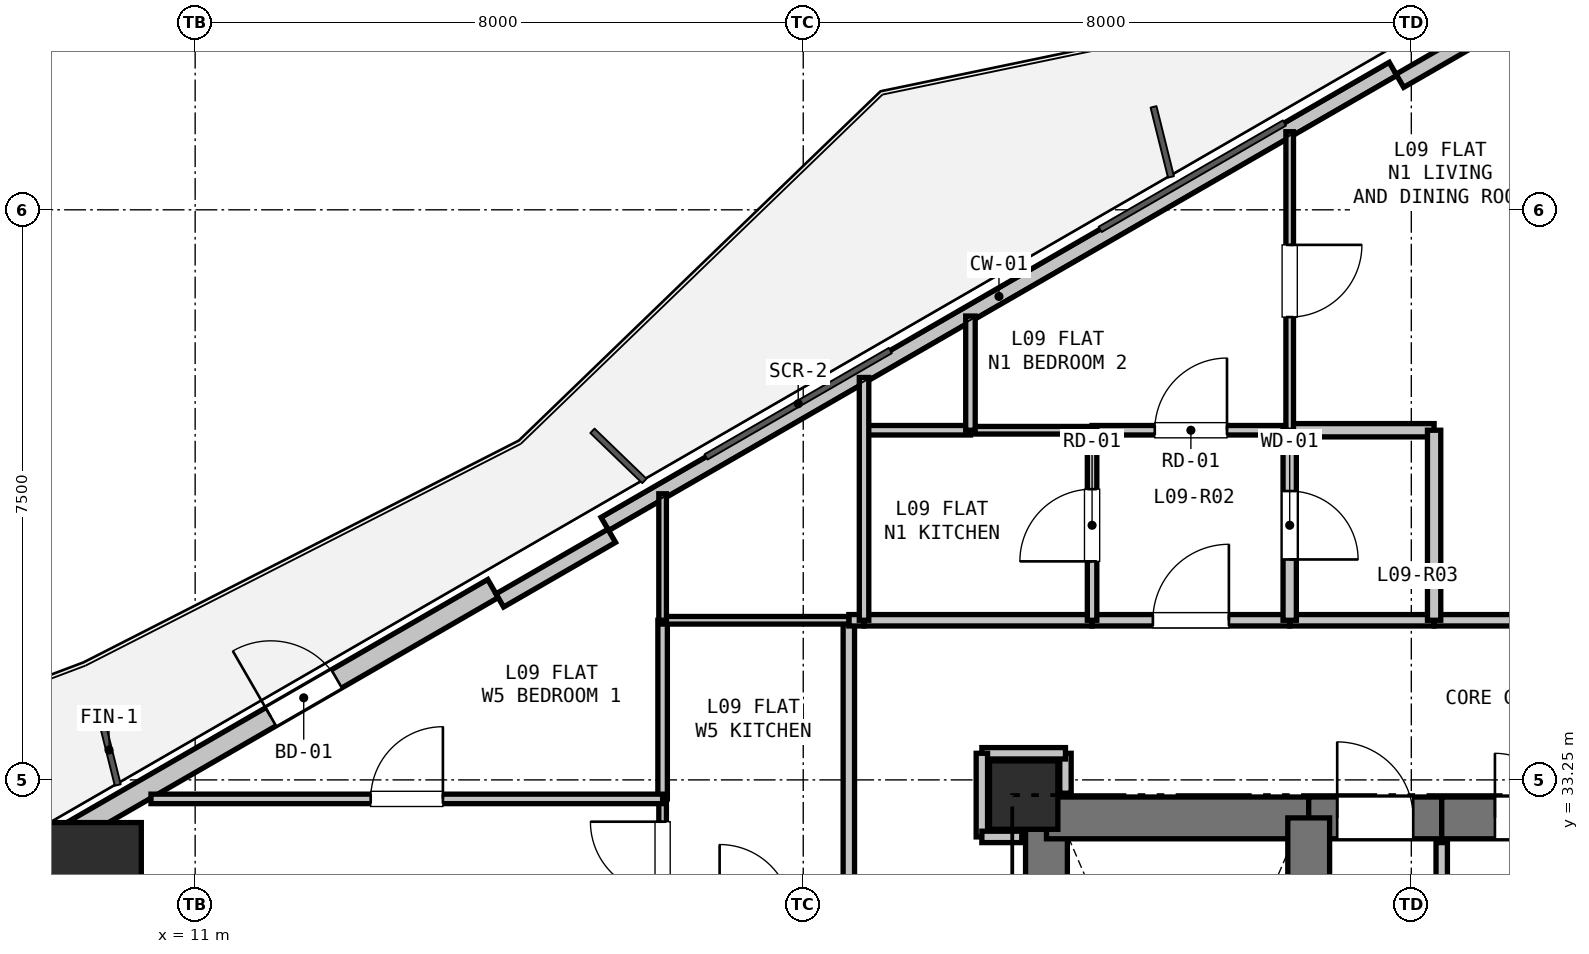
"""IFC4 building model, lengths in metres.
Left out: names, types, materials, properties, quantities, classifications, styles, units other than length and angle.
Written with IfcOpenShell. Run it as: python <this file> out.ifc"""

import sys

from ifc_helpers import new_model, si_unit, direction, frame, frame_2d, origin, origin_2d, place, context, subcontext, project, spatial, rectangle, hollow_rectangle, extrude, element, fill, save


model = new_model("IFC4")
c1 = context("Model", 3, precision=1e-05, world=origin(), true_north=direction((0.0, 1.0)))
c2 = subcontext(c1, "Body", "Model", "MODEL_VIEW")
j1 = project(units=[si_unit("LENGTHUNIT", "METRE"), si_unit("PLANEANGLEUNIT", "RADIAN")], contexts=[c1])
p1 = place(None, origin())
s1 = spatial("IfcSite", under=j1, at=p1, CompositionType="ELEMENT")
p2 = place(p1, origin())
s2 = spatial("IfcBuilding", under=s1, at=p2, CompositionType="ELEMENT")
p3 = place(p2, frame((0.0, 0.0, 35.7)))
s3 = spatial("IfcBuildingStorey", under=s2, at=p3, CompositionType="ELEMENT", Elevation=35.7)
p4 = place(p3, frame((21.9, 33.05, 0.0), z_axis=(0.0, 0.0, 1.0), x_axis=(1.0, 0.0, 0.0)))
e1 = element("IfcColumn", 1, at=p4, inside=s3, PredefinedType="COLUMN", context=c2, shape_type="SweptSolid", body=[
    extrude(rectangle(XDim=0.9, YDim=0.9, at=origin_2d()), origin(), (0.0, 0.0, 1.0), 3.3),
])
p5 = place(p3, frame((9.617, 32.014, 0.0), z_axis=(0.0, 0.0, 1.0), x_axis=(1.0, 0.0, 0.0)))
e2 = element("IfcColumn", 2, at=p5, inside=s3, PredefinedType="COLUMN", context=c2, shape_type="SweptSolid", body=[
    extrude(hollow_rectangle(XDim=1.35, YDim=1.35, WallThickness=0.036, at=origin_2d()), origin(), (0.0, 0.0, 1.0), 3.3),
])
p6 = place(p3, frame((3.943, 29.431, 0.0), z_axis=(0.0, 0.0, 1.0), x_axis=(0.866027105532, 0.499997052475, 0.0)))
e3 = element("IfcWall", 3, at=p6, inside=s3, PredefinedType="SOLIDWALL", context=c2, shape_type="SweptSolid", body=[
    extrude(rectangle(XDim=12.673, YDim=0.275, at=frame_2d((6.336, 0.0))), origin(), (0.0, 0.0, 1.0), 2.66),
])
p7 = place(p6, frame((9.298, 0.0, 0.0)))
e4 = element("IfcOpeningElement", 4, at=p7, cuts=e3, PredefinedType="OPENING", context=c2, shape_type="SweptSolid", body=[
    extrude(rectangle(XDim=1.0, YDim=2.1, at=frame_2d((0.5, 1.05))), frame((0.0, 0.147, 0.0), z_axis=(0.0, -1.0, 0.0), x_axis=(1.0, 0.0, 0.0)), (0.0, 0.0, 1.0), 0.295),
])
p8 = place(p3, frame((16.39, 36.617, 0.0), z_axis=(0.0, 0.0, 1.0), x_axis=(0.866027351828, 0.499996625875, 0.0)))
e5 = element("IfcWall", 5, at=p8, inside=s3, PredefinedType="PARAPET", context=c2, shape_type="SweptSolid", body=[
    extrude(rectangle(XDim=11.973, YDim=0.2, at=frame_2d((5.987, 0.0))), origin(), (0.0, 0.0, 1.0), 0.2),
])
for number, where, z_axis, x_axis in (
    (6, (15.008, 35.611, 0.0), (0.0, 0.0, 1.0), (0.866, 0.5, 0.0)),
    (7, (26.85, 42.448, 0.0), (0.0, 0.0, 1.0), (0.866, 0.5, 0.0)),
):
    element("IfcWall", number, at=place(p3, frame(where, z_axis=z_axis, x_axis=x_axis)), inside=s3, PredefinedType="PARAPET", context=c2, shape_type="SweptSolid", body=[
        extrude(rectangle(XDim=1.7, YDim=0.2, at=frame_2d((0.85, 0.0))), origin(), (0.0, 0.0, 1.0), 2.66),
    ])
p9 = place(p3, frame((22.2, 25.4, 0.0), z_axis=(0.0, 0.0, 1.0), x_axis=(0.0, 1.0, 0.0)))
e8 = element("IfcWall", 8, at=p9, inside=s3, PredefinedType="SHEAR", context=c2, shape_type="SweptSolid", body=[
    extrude(rectangle(XDim=7.35, YDim=0.55, at=frame_2d((3.675, 0.0))), origin(), (0.0, 0.0, 1.0), 3.04),
])
p10 = place(p3, frame((22.2, 32.75, 0.0), z_axis=(0.0, 0.0, 1.0), x_axis=(1.0, 0.0, 0.0)))
e9 = element("IfcWall", 9, at=p10, inside=s3, PredefinedType="SHEAR", context=c2, shape_type="SweptSolid", body=[
    extrude(rectangle(XDim=3.45, YDim=0.55, at=frame_2d((1.725, 0.0))), origin(), (0.0, 0.0, 1.0), 3.04),
])
p11 = place(p3, frame((25.65, 32.75, 0.0), z_axis=(0.0, 0.0, 1.0), x_axis=(1.0, 0.0, 0.0)))
e10 = element("IfcWall", 10, at=p11, inside=s3, PredefinedType="SHEAR", context=c2, shape_type="SweptSolid", body=[
    extrude(rectangle(XDim=1.75, YDim=0.55, at=frame_2d((0.875, 0.0))), origin(), (0.0, 0.0, 1.0), 3.04),
])
p12 = place(p11, frame((0.375, 0.0, 0.0)))
e11 = element("IfcOpeningElement", 11, at=p12, cuts=e10, PredefinedType="OPENING", context=c2, shape_type="SweptSolid", body=[
    extrude(rectangle(XDim=1.0, YDim=2.15, at=frame_2d((0.5, 1.075))), frame((0.0, 0.285, 0.0), z_axis=(0.0, -1.0, 0.0), x_axis=(1.0, 0.0, 0.0)), (0.0, 0.0, 1.0), 0.57),
])
p13 = place(p3, frame((27.4, 32.75, 0.0), z_axis=(0.0, 0.0, 1.0), x_axis=(1.0, 0.0, 0.0)))
e12 = element("IfcWall", 12, at=p13, inside=s3, PredefinedType="SHEAR", context=c2, shape_type="SweptSolid", body=[
    extrude(rectangle(XDim=2.25, YDim=0.55, at=frame_2d((1.125, 0.0))), origin(), (0.0, 0.0, 1.0), 3.04),
])
p14 = place(p13, frame((0.7, 0.0, 0.0)))
e13 = element("IfcOpeningElement", 13, at=p14, cuts=e12, PredefinedType="OPENING", context=c2, shape_type="SweptSolid", body=[
    extrude(rectangle(XDim=0.85, YDim=2.1, at=frame_2d((0.425, 1.05))), frame((0.0, 0.285, 0.0), z_axis=(0.0, -1.0, 0.0), x_axis=(1.0, 0.0, 0.0)), (0.0, 0.0, 1.0), 0.57),
])
p15 = place(p3, frame((25.65, 27.95, 0.0), z_axis=(0.0, 0.0, 1.0), x_axis=(0.0, 1.0, 0.0)))
e14 = element("IfcWall", 14, at=p15, inside=s3, PredefinedType="SHEAR", context=c2, shape_type="SweptSolid", body=[
    extrude(rectangle(XDim=4.8, YDim=0.55, at=frame_2d((2.4, 0.0))), origin(), (0.0, 0.0, 1.0), 3.04),
])
p16 = place(p3, frame((27.4, 32.425, 0.0), z_axis=(0.0, 0.0, 1.0), x_axis=(0.0, -1.0, 0.0)))
e15 = element("IfcWall", 15, at=p16, inside=s3, PredefinedType="PARTITIONING", context=c2, shape_type="SweptSolid", body=[
    extrude(rectangle(XDim=2.125, YDim=0.15, at=frame_2d((1.062, 0.0))), origin(), (0.0, 0.0, 1.0), 3.04),
])
p17 = place(p16, frame((0.637, 0.0, 0.0)))
e16 = element("IfcOpeningElement", 16, at=p17, cuts=e15, PredefinedType="OPENING", context=c2, shape_type="SweptSolid", body=[
    extrude(rectangle(XDim=0.85, YDim=2.1, at=frame_2d((0.425, 1.05))), frame((0.0, 0.085, 0.0), z_axis=(0.0, -1.0, 0.0), x_axis=(1.0, 0.0, 0.0)), (0.0, 0.0, 1.0), 0.17),
])
p18 = place(p3, frame((19.6, 31.45, 0.0), z_axis=(0.0, 0.0, 1.0), x_axis=(0.0, 1.0, 0.0)))
e17 = element("IfcWall", 17, at=p18, inside=s3, PredefinedType="PARTITIONING", context=c2, shape_type="SweptSolid", body=[
    extrude(rectangle(XDim=3.9, YDim=0.15, at=frame_2d((1.95, 0.0))), origin(), (0.0, 0.0, 1.0), 2.338),
])
p19 = place(p3, frame((19.6, 35.35, 0.0), z_axis=(0.0, 0.0, 1.0), x_axis=(1.0, 0.0, 0.0)))
e18 = element("IfcWall", 18, at=p19, inside=s3, PredefinedType="PARTITIONING", context=c2, shape_type="SweptSolid", body=[
    extrude(rectangle(XDim=0.2, YDim=0.15, at=frame_2d((0.1, 0.0))), origin(), (0.0, 0.0, 1.0), 3.04),
])
p20 = place(p3, frame((19.8, 35.35, 0.0), z_axis=(0.0, 0.0, 1.0), x_axis=(1.0, 0.0, 0.0)))
e19 = element("IfcWall", 19, at=p20, inside=s3, PredefinedType="PARTITIONING", context=c2, shape_type="SweptSolid", body=[
    extrude(rectangle(XDim=3.0, YDim=0.15, at=frame_2d((1.5, 0.0))), origin(), (0.0, 0.0, 1.0), 3.04),
])
p21 = place(p3, frame((22.8, 35.35, 0.0), z_axis=(0.0, 0.0, 1.0), x_axis=(1.0, 0.0, 0.0)))
e20 = element("IfcWall", 20, at=p21, inside=s3, PredefinedType="PARTITIONING", context=c2, shape_type="SweptSolid", body=[
    extrude(rectangle(XDim=2.6, YDim=0.15, at=frame_2d((1.3, 0.0))), origin(), (0.0, 0.0, 1.0), 3.04),
])
p22 = place(p21, frame((0.8, 0.0, 0.0)))
e21 = element("IfcOpeningElement", 21, at=p22, cuts=e20, PredefinedType="OPENING", context=c2, shape_type="SweptSolid", body=[
    extrude(rectangle(XDim=1.0, YDim=2.15, at=frame_2d((0.5, 1.075))), frame((0.0, 0.085, 0.0), z_axis=(0.0, -1.0, 0.0), x_axis=(1.0, 0.0, 0.0)), (0.0, 0.0, 1.0), 0.17),
])
p23 = place(p3, frame((25.4, 35.35, 0.0), z_axis=(0.0, 0.0, 1.0), x_axis=(1.0, 0.0, 0.0)))
e22 = element("IfcWall", 22, at=p23, inside=s3, PredefinedType="PARTITIONING", context=c2, shape_type="SweptSolid", body=[
    extrude(rectangle(XDim=1.9, YDim=0.15, at=frame_2d((0.95, 0.0))), origin(), (0.0, 0.0, 1.0), 3.04),
])
p24 = place(p3, frame((27.3, 35.35, 0.0), z_axis=(0.0, 0.0, 1.0), x_axis=(1.0, 0.0, 0.0)))
e23 = element("IfcWall", 23, at=p24, inside=s3, PredefinedType="PARTITIONING", context=c2, shape_type="SweptSolid", body=[
    extrude(rectangle(XDim=1.6, YDim=0.15, at=frame_2d((0.8, 0.0))), origin(), (0.0, 0.0, 1.0), 3.04),
])
p25 = place(p3, frame((22.45, 33.075, 0.0), z_axis=(0.0, 0.0, 1.0), x_axis=(0.0, 1.0, 0.0)))
e24 = element("IfcWall", 24, at=p25, inside=s3, PredefinedType="PARTITIONING", context=c2, shape_type="SweptSolid", body=[
    extrude(rectangle(XDim=0.525, YDim=0.15, at=frame_2d((0.263, 0.0))), origin(), (0.0, 0.0, 1.0), 2.488),
])
p26 = place(p3, frame((22.45, 33.6, 0.0), z_axis=(0.0, 0.0, 1.0), x_axis=(-1.0, 0.0, 0.0)))
e25 = element("IfcWall", 25, at=p26, inside=s3, PredefinedType="PARTITIONING", context=c2, shape_type="SweptSolid", body=[
    extrude(rectangle(XDim=1.1, YDim=0.15, at=frame_2d((0.55, 0.0))), origin(), (0.0, 0.0, 1.0), 3.04),
])
p27 = place(p3, frame((21.35, 33.6, 0.0), z_axis=(0.0, 0.0, 1.0), x_axis=(0.0, -1.0, 0.0)))
e26 = element("IfcWall", 26, at=p27, inside=s3, PredefinedType="PARTITIONING", context=c2, shape_type="SweptSolid", body=[
    extrude(rectangle(XDim=1.1, YDim=0.15, at=frame_2d((0.55, 0.0))), origin(), (0.0, 0.0, 1.0), 2.338),
])
p28 = place(p3, frame((21.35, 32.5, 0.0), z_axis=(0.0, 0.0, 1.0), x_axis=(1.0, 0.0, 0.0)))
e27 = element("IfcWall", 27, at=p28, inside=s3, PredefinedType="PARTITIONING", context=c2, shape_type="SweptSolid", body=[
    extrude(rectangle(XDim=0.525, YDim=0.15, at=frame_2d((0.262, 0.0))), origin(), (0.0, 0.0, 1.0), 2.488),
])
p29 = place(p3, frame((22.8, 37.85, 0.0), z_axis=(0.0, 0.0, 1.0), x_axis=(1.0, 0.0, 0.0)))
e28 = element("IfcWall", 28, at=p29, inside=s3, PredefinedType="PARTITIONING", context=c2, shape_type="SweptSolid", body=[
    extrude(rectangle(XDim=2.6, YDim=0.125, at=frame_2d((1.3, 0.0))), origin(), (0.0, 0.0, 1.0), 3.04),
])
p30 = place(p29, frame((0.825, 0.0, 0.0)))
e29 = element("IfcOpeningElement", 29, at=p30, cuts=e28, PredefinedType="OPENING", context=c2, shape_type="SweptSolid", body=[
    extrude(rectangle(XDim=0.95, YDim=2.1, at=frame_2d((0.475, 1.05))), frame((0.0, 0.073, 0.0), z_axis=(0.0, -1.0, 0.0), x_axis=(1.0, 0.0, 0.0)), (0.0, 0.0, 1.0), 0.145),
])
p31 = place(p3, frame((25.4, 37.85, 0.0), z_axis=(0.0, 0.0, 1.0), x_axis=(0.0, -1.0, 0.0)))
e30 = element("IfcWall", 30, at=p31, inside=s3, PredefinedType="PLUMBINGWALL", context=c2, shape_type="SweptSolid", body=[
    extrude(rectangle(XDim=2.5, YDim=0.175, at=frame_2d((1.25, 0.0))), origin(), (0.0, 0.0, 1.0), 3.04),
])
p32 = place(p31, frame((0.8, 0.0, 0.0)))
e31 = element("IfcOpeningElement", 31, at=p32, cuts=e30, PredefinedType="OPENING", context=c2, shape_type="SweptSolid", body=[
    extrude(rectangle(XDim=0.9, YDim=2.1, at=frame_2d((0.45, 1.05))), frame((0.0, 0.097, 0.0), z_axis=(0.0, -1.0, 0.0), x_axis=(1.0, 0.0, 0.0)), (0.0, 0.0, 1.0), 0.195),
])
p33 = place(p3, frame((22.8, 35.35, 0.0), z_axis=(0.0, 0.0, 1.0), x_axis=(0.0, 1.0, 0.0)))
e32 = element("IfcWall", 32, at=p33, inside=s3, PredefinedType="PARTITIONING", context=c2, shape_type="SweptSolid", body=[
    extrude(rectangle(XDim=2.5, YDim=0.125, at=frame_2d((1.25, 0.0))), origin(), (0.0, 0.0, 1.0), 3.04),
])
p34 = place(p33, frame((0.775, 0.0, 0.0)))
e33 = element("IfcOpeningElement", 33, at=p34, cuts=e32, PredefinedType="OPENING", context=c2, shape_type="SweptSolid", body=[
    extrude(rectangle(XDim=0.95, YDim=2.1, at=frame_2d((0.475, 1.05))), frame((0.0, 0.073, 0.0), z_axis=(0.0, -1.0, 0.0), x_axis=(1.0, 0.0, 0.0)), (0.0, 0.0, 1.0), 0.145),
])
p35 = place(p3, frame((25.4, 37.85, 0.0), z_axis=(0.0, 0.0, 1.0), x_axis=(1.0, 0.0, 0.0)))
e34 = element("IfcWall", 34, at=p35, inside=s3, PredefinedType="PLUMBINGWALL", context=c2, shape_type="SweptSolid", body=[
    extrude(rectangle(XDim=1.9, YDim=0.175, at=frame_2d((0.95, 0.0))), origin(), (0.0, 0.0, 1.0), 3.04),
])
p36 = place(p3, frame((27.3, 37.85, 0.0), z_axis=(0.0, 0.0, 1.0), x_axis=(0.0, -1.0, 0.0)))
e35 = element("IfcWall", 35, at=p36, inside=s3, PredefinedType="PLUMBINGWALL", context=c2, shape_type="SweptSolid", body=[
    extrude(rectangle(XDim=2.5, YDim=0.175, at=frame_2d((1.25, 0.0))), origin(), (0.0, 0.0, 1.0), 3.04),
])
p37 = place(p3, frame((19.8, 37.85, 0.0), z_axis=(0.0, 0.0, 1.0), x_axis=(1.0, 0.0, 0.0)))
e36 = element("IfcWall", 36, at=p37, inside=s3, PredefinedType="PARTITIONING", context=c2, shape_type="SweptSolid", body=[
    extrude(rectangle(XDim=1.4, YDim=0.125, at=frame_2d((0.7, 0.0))), origin(), (0.0, 0.0, 1.0), 2.365),
])
p38 = place(p3, frame((21.2, 37.85, 0.0), z_axis=(0.0, 0.0, 1.0), x_axis=(1.0, 0.0, 0.0)))
e37 = element("IfcWall", 37, at=p38, inside=s3, PredefinedType="PARTITIONING", context=c2, shape_type="SweptSolid", body=[
    extrude(rectangle(XDim=1.6, YDim=0.1, at=frame_2d((0.8, 0.0))), origin(), (0.0, 0.0, 1.0), 3.04),
])
p39 = place(p3, frame((19.8, 35.35, 0.0), z_axis=(0.0, 0.0, 1.0), x_axis=(0.0, 1.0, 0.0)))
e38 = element("IfcWall", 38, at=p39, inside=s3, PredefinedType="PARTITIONING", context=c2, shape_type="SweptSolid", body=[
    extrude(rectangle(XDim=3.194, YDim=0.125, at=frame_2d((1.597, 0.0))), origin(), (0.0, 0.0, 1.0), 2.365),
])
p40 = place(p3, frame((17.15, 31.45, 0.0), z_axis=(0.0, 0.0, 1.0), x_axis=(0.0, 1.0, 0.0)))
e39 = element("IfcWall", 39, at=p40, inside=s3, PredefinedType="PARTITIONING", context=c2, shape_type="SweptSolid", body=[
    extrude(rectangle(XDim=1.55, YDim=0.1, at=frame_2d((0.775, 0.0))), origin(), (0.0, 0.0, 1.0), 2.338),
])
p41 = place(p40, frame((0.3, 0.0, 0.0)))
e40 = element("IfcOpeningElement", 40, at=p41, cuts=e39, PredefinedType="OPENING", context=c2, shape_type="SweptSolid", body=[
    extrude(rectangle(XDim=0.95, YDim=2.1, at=frame_2d((0.475, 1.05))), frame((0.0, 0.06, 0.0), z_axis=(0.0, -1.0, 0.0), x_axis=(1.0, 0.0, 0.0)), (0.0, 0.0, 1.0), 0.12),
])
p42 = place(p3, frame((17.15, 33.0, 0.0), z_axis=(0.0, 0.0, 1.0), x_axis=(0.0, 1.0, 0.0)))
e41 = element("IfcWall", 41, at=p42, inside=s3, PredefinedType="PARTITIONING", context=c2, shape_type="SweptSolid", body=[
    extrude(rectangle(XDim=2.35, YDim=0.125, at=frame_2d((1.175, 0.0))), origin(), (0.0, 0.0, 1.0), 3.04),
])
p43 = place(p3, frame((17.15, 35.35, 0.0), z_axis=(0.0, 0.0, 1.0), x_axis=(1.0, 0.0, 0.0)))
e42 = element("IfcWall", 42, at=p43, inside=s3, PredefinedType="PARTITIONING", context=c2, shape_type="SweptSolid", body=[
    extrude(rectangle(XDim=2.45, YDim=0.1, at=frame_2d((1.225, 0.0))), origin(), (0.0, 0.0, 1.0), 3.04),
])
p44 = place(p3, frame((21.2, 37.85, 0.0), z_axis=(0.0, 0.0, 1.0), x_axis=(0.0, 1.0, 0.0)))
e43 = element("IfcWall", 43, at=p44, inside=s3, PredefinedType="PARTITIONING", context=c2, shape_type="SweptSolid", body=[
    extrude(rectangle(XDim=1.502, YDim=0.125, at=frame_2d((0.751, 0.0))), origin(), (0.0, 0.0, 1.0), 2.365),
])
p45 = place(p3, frame((25.4, 41.777, 0.0), z_axis=(0.0, 0.0, 1.0), x_axis=(0.0, -1.0, 0.0)))
e44 = element("IfcWall", 44, at=p45, inside=s3, PredefinedType="PARTITIONING", context=c2, shape_type="SweptSolid", body=[
    extrude(rectangle(XDim=3.927, YDim=0.1, at=frame_2d((1.964, 0.0))), origin(), (0.0, 0.0, 1.0), 2.365),
])
p46 = place(p45, frame((1.489, 0.0, 0.0)))
e45 = element("IfcOpeningElement", 45, at=p46, cuts=e44, PredefinedType="OPENING", context=c2, shape_type="SweptSolid", body=[
    extrude(rectangle(XDim=0.95, YDim=2.1, at=frame_2d((0.475, 1.05))), frame((0.0, 0.06, 0.0), z_axis=(0.0, -1.0, 0.0), x_axis=(1.0, 0.0, 0.0)), (0.0, 0.0, 1.0), 0.12),
])
p47 = place(p3, frame((10.419, 33.0, 0.0), z_axis=(0.0, 0.0, 1.0), x_axis=(1.0, 0.0, 0.0)))
e46 = element("IfcWall", 46, at=p47, inside=s3, PredefinedType="PARTITIONING", context=c2, shape_type="SweptSolid", body=[
    extrude(rectangle(XDim=6.731, YDim=0.125, at=frame_2d((3.365, 0.0))), origin(), (0.0, 0.0, 1.0), 2.365),
])
p48 = place(p47, frame((2.89, 0.0, 0.0)))
e47 = element("IfcOpeningElement", 47, at=p48, cuts=e46, PredefinedType="OPENING", context=c2, shape_type="SweptSolid", body=[
    extrude(rectangle(XDim=0.95, YDim=2.1, at=frame_2d((0.475, 1.05))), frame((0.0, 0.073, 0.0), z_axis=(0.0, -1.0, 0.0), x_axis=(1.0, 0.0, 0.0)), (0.0, 0.0, 1.0), 0.145),
])
p49 = place(p3, frame((17.15, 37.014, 0.0), z_axis=(0.0, 0.0, 1.0), x_axis=(0.0, -1.0, 0.0)))
e48 = element("IfcWall", 48, at=p49, inside=s3, PredefinedType="PARTITIONING", context=c2, shape_type="SweptSolid", body=[
    extrude(rectangle(XDim=1.664, YDim=0.1, at=frame_2d((0.832, 0.0))), origin(), (0.0, 0.0, 1.0), 2.365),
])
p50 = place(p7, origin())
e49 = element("IfcDoor", 49, at=p50, inside=s3, OperationType="SINGLE_SWING_LEFT", PredefinedType="DOOR", context=c2, shape_type="SweptSolid", body=[
    extrude(rectangle(XDim=1.0, YDim=2.1, at=frame_2d((0.5, 1.05))), frame((0.0, 0.025, 0.0), z_axis=(0.0, -1.0, 0.0), x_axis=(1.0, 0.0, 0.0)), (0.0, 0.0, 1.0), 0.05),
])
fill(e4, e49)
p51 = place(p12, origin())
e50 = element("IfcDoor", 50, at=p51, inside=s3, OperationType="SINGLE_SWING_LEFT", PredefinedType="DOOR", context=c2, shape_type="SweptSolid", body=[
    extrude(rectangle(XDim=1.0, YDim=2.15, at=frame_2d((0.5, 1.075))), frame((0.0, 0.025, 0.0), z_axis=(0.0, -1.0, 0.0), x_axis=(1.0, 0.0, 0.0)), (0.0, 0.0, 1.0), 0.05),
])
fill(e11, e50)
p52 = place(p22, origin())
e51 = element("IfcDoor", 51, at=p52, inside=s3, OperationType="SINGLE_SWING_RIGHT", PredefinedType="DOOR", context=c2, shape_type="SweptSolid", body=[
    extrude(rectangle(XDim=1.0, YDim=2.15, at=frame_2d((0.5, 1.075))), frame((0.0, 0.025, 0.0), z_axis=(0.0, -1.0, 0.0), x_axis=(1.0, 0.0, 0.0)), (0.0, 0.0, 1.0), 0.05),
])
fill(e21, e51)
p53 = place(p14, origin())
e52 = element("IfcDoor", 52, at=p53, inside=s3, OperationType="SINGLE_SWING_LEFT", PredefinedType="DOOR", context=c2, shape_type="SweptSolid", body=[
    extrude(rectangle(XDim=0.85, YDim=2.1, at=frame_2d((0.425, 1.05))), frame((0.0, 0.025, 0.0), z_axis=(0.0, -1.0, 0.0), x_axis=(1.0, 0.0, 0.0)), (0.0, 0.0, 1.0), 0.05),
])
fill(e13, e52)
p54 = place(p32, origin())
e53 = element("IfcDoor", 53, at=p54, inside=s3, OperationType="SINGLE_SWING_RIGHT", PredefinedType="DOOR", context=c2, shape_type="SweptSolid", body=[
    extrude(rectangle(XDim=0.9, YDim=2.1, at=frame_2d((0.45, 1.05))), frame((0.0, 0.025, 0.0), z_axis=(0.0, -1.0, 0.0), x_axis=(1.0, 0.0, 0.0)), (0.0, 0.0, 1.0), 0.05),
])
fill(e31, e53)
p55 = place(p34, origin())
e54 = element("IfcDoor", 54, at=p55, inside=s3, OperationType="SINGLE_SWING_LEFT", PredefinedType="DOOR", context=c2, shape_type="SweptSolid", body=[
    extrude(rectangle(XDim=0.95, YDim=2.1, at=frame_2d((0.475, 1.05))), frame((0.0, 0.025, 0.0), z_axis=(0.0, -1.0, 0.0), x_axis=(1.0, 0.0, 0.0)), (0.0, 0.0, 1.0), 0.05),
])
fill(e33, e54)
p56 = place(p30, origin())
e55 = element("IfcDoor", 55, at=p56, inside=s3, OperationType="SINGLE_SWING_RIGHT", PredefinedType="DOOR", context=c2, shape_type="SweptSolid", body=[
    extrude(rectangle(XDim=0.95, YDim=2.1, at=frame_2d((0.475, 1.05))), frame((0.0, 0.025, 0.0), z_axis=(0.0, -1.0, 0.0), x_axis=(1.0, 0.0, 0.0)), (0.0, 0.0, 1.0), 0.05),
])
fill(e29, e55)
p57 = place(p41, origin())
e56 = element("IfcDoor", 56, at=p57, inside=s3, OperationType="SINGLE_SWING_RIGHT", PredefinedType="DOOR", context=c2, shape_type="SweptSolid", body=[
    extrude(rectangle(XDim=0.95, YDim=2.1, at=frame_2d((0.475, 1.05))), frame((0.0, 0.025, 0.0), z_axis=(0.0, -1.0, 0.0), x_axis=(1.0, 0.0, 0.0)), (0.0, 0.0, 1.0), 0.05),
])
fill(e40, e56)
p58 = place(p46, origin())
e57 = element("IfcDoor", 57, at=p58, inside=s3, OperationType="SINGLE_SWING_LEFT", PredefinedType="DOOR", context=c2, shape_type="SweptSolid", body=[
    extrude(rectangle(XDim=0.95, YDim=2.1, at=frame_2d((0.475, 1.05))), frame((0.0, 0.025, 0.0), z_axis=(0.0, -1.0, 0.0), x_axis=(1.0, 0.0, 0.0)), (0.0, 0.0, 1.0), 0.05),
])
fill(e45, e57)
p59 = place(p48, origin())
e58 = element("IfcDoor", 58, at=p59, inside=s3, OperationType="SINGLE_SWING_RIGHT", PredefinedType="DOOR", context=c2, shape_type="SweptSolid", body=[
    extrude(rectangle(XDim=0.95, YDim=2.1, at=frame_2d((0.475, 1.05))), frame((0.0, 0.025, 0.0), z_axis=(0.0, -1.0, 0.0), x_axis=(1.0, 0.0, 0.0)), (0.0, 0.0, 1.0), 0.05),
])
fill(e47, e58)
save(model, sys.argv[1])
